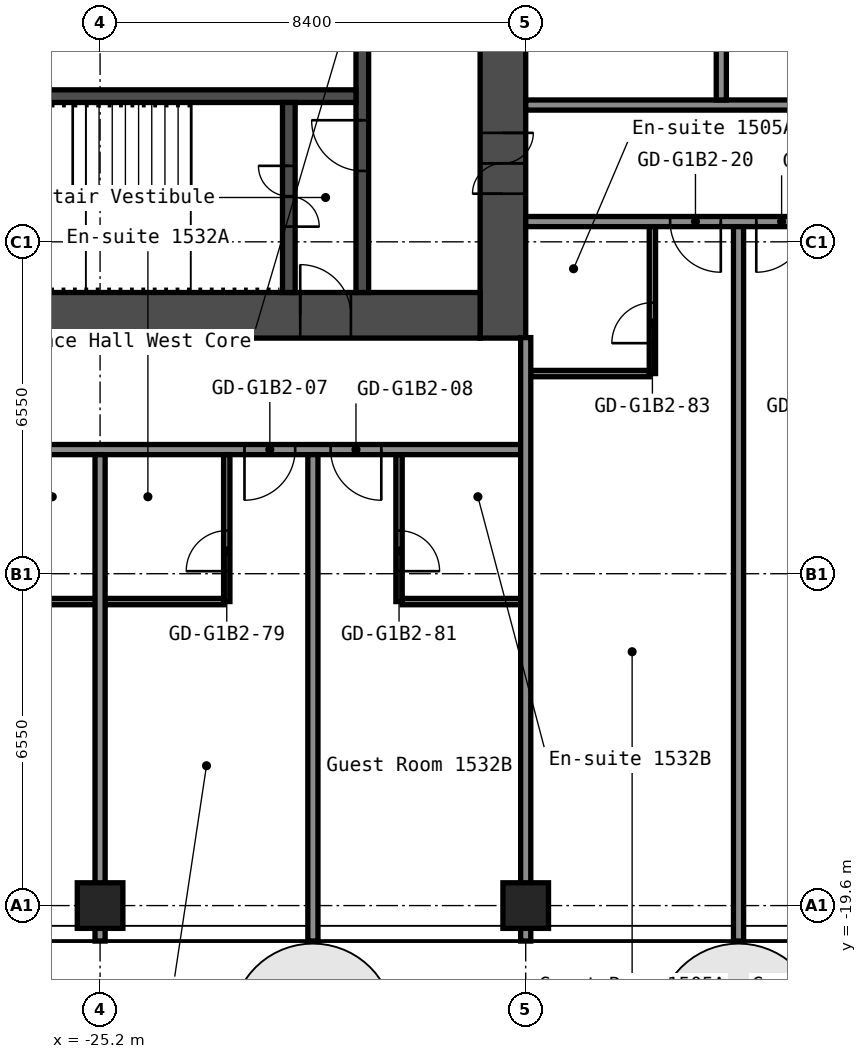
"""IFC4 building model, lengths in metres.
Left out: names, types, materials, properties, quantities, classifications, styles, units other than length and angle.
Written with IfcOpenShell. Run it as: python <this file> out.ifc"""

import sys

from ifc_helpers import new_model, si_unit, direction, frame, frame_2d, origin, origin_2d, place, context, subcontext, project, spatial, rectangle, hollow_rectangle, extrude, element, fill, save


model = new_model("IFC4")
c1 = context("Model", 3, precision=1e-05, world=origin(), true_north=direction((0.0, 1.0)))
c2 = subcontext(c1, "Body", "Model", "MODEL_VIEW")
j1 = project(units=[si_unit("LENGTHUNIT", "METRE"), si_unit("PLANEANGLEUNIT", "RADIAN")], contexts=[c1])
p1 = place(None, origin())
s1 = spatial("IfcSite", under=j1, at=p1, CompositionType="ELEMENT")
p2 = place(p1, origin())
s2 = spatial("IfcBuilding", under=s1, at=p2, CompositionType="ELEMENT")
p3 = place(p2, frame((0.0, 0.0, 55.0)))
s3 = spatial("IfcBuildingStorey", under=s2, at=p3, CompositionType="ELEMENT", Elevation=55.0)
for number, where, z_axis, x_axis in (
    (1, (-25.2, -19.6, 0.0), (0.0, 0.0, 1.0), (1.0, 0.0, 0.0)),
    (2, (-16.8, -19.6, 0.0), (0.0, 0.0, 1.0), (1.0, 0.0, 0.0)),
):
    element("IfcColumn", number, at=place(p3, frame(where, z_axis=z_axis, x_axis=x_axis)), inside=s3, PredefinedType="COLUMN", context=c2, shape_type="SweptSolid", body=[
        extrude(hollow_rectangle(XDim=0.9, YDim=0.9, WallThickness=0.036, at=origin_2d()), origin(), (0.0, 0.0, 1.0), 2.8),
    ])
p4 = place(p3, frame((-17.25, -8.4, 0.0), z_axis=(0.0, 0.0, 1.0), x_axis=(0.0, 1.0, 0.0)))
e3 = element("IfcWall", 3, at=p4, inside=s3, PredefinedType="SHEAR", context=c2, shape_type="SweptSolid", body=[
    extrude(rectangle(XDim=16.8, YDim=0.9, at=frame_2d((8.4, 0.0))), origin(), (0.0, 0.0, 1.0), 2.8),
])
p5 = place(p4, frame((12.75, 0.0, 0.0)))
e4 = element("IfcOpeningElement", 4, at=p5, cuts=e3, PredefinedType="OPENING", context=c2, shape_type="SweptSolid", body=[
    extrude(rectangle(XDim=1.2, YDim=2.1, at=frame_2d((0.6, 1.05))), frame((0.0, 0.46, 0.0), z_axis=(0.0, -1.0, 0.0), x_axis=(1.0, 0.0, 0.0)), (0.0, 0.0, 1.0), 0.92),
])
p6 = place(p4, frame((2.85, 0.0, 0.0)))
e5 = element("IfcOpeningElement", 5, at=p6, cuts=e3, PredefinedType="OPENING", context=c2, shape_type="SweptSolid", body=[
    extrude(rectangle(XDim=1.2, YDim=2.1, at=frame_2d((0.6, 1.05))), frame((0.0, 0.46, 0.0), z_axis=(0.0, -1.0, 0.0), x_axis=(1.0, 0.0, 0.0)), (0.0, 0.0, 1.0), 0.92),
])
p7 = place(p3, frame((-32.7, -7.95, 0.0), z_axis=(0.0, 0.0, 1.0), x_axis=(1.0, 0.0, 0.0)))
e6 = element("IfcWall", 6, at=p7, inside=s3, PredefinedType="SHEAR", context=c2, shape_type="SweptSolid", body=[
    extrude(rectangle(XDim=15.0, YDim=0.9, at=frame_2d((7.5, 0.0))), origin(), (0.0, 0.0, 1.0), 2.8),
])
p8 = place(p7, frame((11.45, 0.0, 0.0)))
e7 = element("IfcOpeningElement", 7, at=p8, cuts=e6, PredefinedType="OPENING", context=c2, shape_type="SweptSolid", body=[
    extrude(rectangle(XDim=1.0, YDim=2.1, at=frame_2d((0.5, 1.05))), frame((0.0, 0.46, 0.0), z_axis=(0.0, -1.0, 0.0), x_axis=(1.0, 0.0, 0.0)), (0.0, 0.0, 1.0), 0.92),
])
p9 = place(p3, frame((-20.025, -7.5, 0.0), z_axis=(0.0, 0.0, 1.0), x_axis=(0.0, 1.0, 0.0)))
e8 = element("IfcWall", 8, at=p9, inside=s3, PredefinedType="SHEAR", context=c2, shape_type="SweptSolid", body=[
    extrude(rectangle(XDim=6.3, YDim=0.25, at=frame_2d((3.15, 0.0))), origin(), (0.0, 0.0, 1.0), 2.8),
])
p10 = place(p9, frame((2.4, 0.0, 0.0)))
e9 = element("IfcOpeningElement", 9, at=p10, cuts=e8, PredefinedType="OPENING", context=c2, shape_type="SweptSolid", body=[
    extrude(rectangle(XDim=1.0, YDim=2.1, at=frame_2d((0.5, 1.05))), frame((0.0, 0.135, 0.0), z_axis=(0.0, -1.0, 0.0), x_axis=(1.0, 0.0, 0.0)), (0.0, 0.0, 1.0), 0.27),
])
p11 = place(p3, frame((-27.65, -3.625, 0.0), z_axis=(0.0, 0.0, 1.0), x_axis=(1.0, 0.0, 0.0)))
e10 = element("IfcWall", 10, at=p11, inside=s3, PredefinedType="SHEAR", context=c2, shape_type="SweptSolid", body=[
    extrude(rectangle(XDim=7.5, YDim=0.25, at=frame_2d((3.75, 0.0))), origin(), (0.0, 0.0, 1.0), 2.8),
])
p12 = place(p3, frame((-21.475, -7.5, 0.0), z_axis=(0.0, 0.0, 1.0), x_axis=(0.0, 1.0, 0.0)))
e11 = element("IfcWall", 11, at=p12, inside=s3, PredefinedType="SHEAR", context=c2, shape_type="SweptSolid", body=[
    extrude(rectangle(XDim=3.75, YDim=0.25, at=frame_2d((1.875, 0.0))), origin(), (0.0, 0.0, 1.0), 2.8),
])
p13 = place(p12, frame((1.3, 0.0, 0.0)))
e12 = element("IfcOpeningElement", 12, at=p13, cuts=e11, PredefinedType="OPENING", context=c2, shape_type="SweptSolid", body=[
    extrude(rectangle(XDim=1.2, YDim=2.1, at=frame_2d((0.6, 1.05))), frame((0.0, 0.135, 0.0), z_axis=(0.0, -1.0, 0.0), x_axis=(1.0, 0.0, 0.0)), (0.0, 0.0, 1.0), 0.27),
])
p14 = place(p3, frame((-27.637, -13.6, 0.0), z_axis=(0.0, 0.0, 1.0), x_axis=(1.0, 0.0, 0.0)))
e13 = element("IfcWall", 13, at=p14, inside=s3, PredefinedType="PARTITIONING", context=c2, shape_type="SweptSolid", body=[
    extrude(rectangle(XDim=4.875, YDim=0.125, at=frame_2d((2.438, 0.0))), origin(), (0.0, 0.0, 1.0), 2.8),
])
p15 = place(p3, frame((-19.238, -13.6, 0.0), z_axis=(0.0, 0.0, 1.0), x_axis=(1.0, 0.0, 0.0)))
e14 = element("IfcWall", 14, at=p15, inside=s3, PredefinedType="PARTITIONING", context=c2, shape_type="SweptSolid", body=[
    extrude(rectangle(XDim=2.338, YDim=0.125, at=frame_2d((1.169, 0.0))), origin(), (0.0, 0.0, 1.0), 2.8),
])
p16 = place(p3, frame((-51.1, -10.6, 0.0), z_axis=(0.0, 0.0, 1.0), x_axis=(1.0, 0.0, 0.0)))
e15 = element("IfcWall", 15, at=p16, inside=s3, PredefinedType="PARTITIONING", context=c2, shape_type="SweptSolid", body=[
    extrude(rectangle(XDim=34.3, YDim=0.2, at=frame_2d((17.15, 0.0))), origin(), (0.0, 0.0, 1.0), 2.8),
])
p17 = place(p16, frame((3.25, 0.0, 0.0)))
e16 = element("IfcOpeningElement", 16, at=p17, cuts=e15, PredefinedType="OPENING", context=c2, shape_type="SweptSolid", body=[
    extrude(rectangle(XDim=1.0, YDim=2.1, at=frame_2d((0.5, 1.05))), frame((0.0, 0.11, 0.0), z_axis=(0.0, -1.0, 0.0), x_axis=(1.0, 0.0, 0.0)), (0.0, 0.0, 1.0), 0.22),
])
p18 = place(p16, frame((5.15, 0.0, 0.0)))
e17 = element("IfcOpeningElement", 17, at=p18, cuts=e15, PredefinedType="OPENING", context=c2, shape_type="SweptSolid", body=[
    extrude(rectangle(XDim=1.0, YDim=2.1, at=frame_2d((0.5, 1.05))), frame((0.0, 0.11, 0.0), z_axis=(0.0, -1.0, 0.0), x_axis=(1.0, 0.0, 0.0)), (0.0, 0.0, 1.0), 0.22),
])
p19 = place(p16, frame((11.95, 0.0, 0.0)))
e18 = element("IfcOpeningElement", 18, at=p19, cuts=e15, PredefinedType="OPENING", context=c2, shape_type="SweptSolid", body=[
    extrude(rectangle(XDim=1.0, YDim=2.1, at=frame_2d((0.5, 1.05))), frame((0.0, 0.11, 0.0), z_axis=(0.0, -1.0, 0.0), x_axis=(1.0, 0.0, 0.0)), (0.0, 0.0, 1.0), 0.22),
])
p20 = place(p16, frame((13.65, 0.0, 0.0)))
e19 = element("IfcOpeningElement", 19, at=p20, cuts=e15, PredefinedType="OPENING", context=c2, shape_type="SweptSolid", body=[
    extrude(rectangle(XDim=1.0, YDim=2.1, at=frame_2d((0.5, 1.05))), frame((0.0, 0.11, 0.0), z_axis=(0.0, -1.0, 0.0), x_axis=(1.0, 0.0, 0.0)), (0.0, 0.0, 1.0), 0.22),
])
p21 = place(p16, frame((20.35, 0.0, 0.0)))
e20 = element("IfcOpeningElement", 20, at=p21, cuts=e15, PredefinedType="OPENING", context=c2, shape_type="SweptSolid", body=[
    extrude(rectangle(XDim=1.0, YDim=2.1, at=frame_2d((0.5, 1.05))), frame((0.0, 0.11, 0.0), z_axis=(0.0, -1.0, 0.0), x_axis=(1.0, 0.0, 0.0)), (0.0, 0.0, 1.0), 0.22),
])
p22 = place(p16, frame((22.05, 0.0, 0.0)))
e21 = element("IfcOpeningElement", 21, at=p22, cuts=e15, PredefinedType="OPENING", context=c2, shape_type="SweptSolid", body=[
    extrude(rectangle(XDim=1.0, YDim=2.1, at=frame_2d((0.5, 1.05))), frame((0.0, 0.11, 0.0), z_axis=(0.0, -1.0, 0.0), x_axis=(1.0, 0.0, 0.0)), (0.0, 0.0, 1.0), 0.22),
])
p23 = place(p16, frame((28.75, 0.0, 0.0)))
e22 = element("IfcOpeningElement", 22, at=p23, cuts=e15, PredefinedType="OPENING", context=c2, shape_type="SweptSolid", body=[
    extrude(rectangle(XDim=1.0, YDim=2.1, at=frame_2d((0.5, 1.05))), frame((0.0, 0.11, 0.0), z_axis=(0.0, -1.0, 0.0), x_axis=(1.0, 0.0, 0.0)), (0.0, 0.0, 1.0), 0.22),
])
p24 = place(p16, frame((30.45, 0.0, 0.0)))
e23 = element("IfcOpeningElement", 23, at=p24, cuts=e15, PredefinedType="OPENING", context=c2, shape_type="SweptSolid", body=[
    extrude(rectangle(XDim=1.0, YDim=2.1, at=frame_2d((0.5, 1.05))), frame((0.0, 0.11, 0.0), z_axis=(0.0, -1.0, 0.0), x_axis=(1.0, 0.0, 0.0)), (0.0, 0.0, 1.0), 0.22),
])
p25 = place(p3, frame((-16.7, -9.1, 0.0), z_axis=(0.0, 0.0, 1.0), x_axis=(1.0, 0.0, 0.0)))
e24 = element("IfcWall", 24, at=p25, inside=s3, PredefinedType="PARTITIONING", context=c2, shape_type="SweptSolid", body=[
    extrude(rectangle(XDim=2.337, YDim=0.125, at=frame_2d((1.169, 0.0))), origin(), (0.0, 0.0, 1.0), 2.8),
])
p26 = place(p3, frame((-16.8, -6.1, 0.0), z_axis=(0.0, 0.0, 1.0), x_axis=(1.0, 0.0, 0.0)))
e25 = element("IfcWall", 25, at=p26, inside=s3, PredefinedType="PARTITIONING", context=c2, shape_type="SweptSolid", body=[
    extrude(rectangle(XDim=33.6, YDim=0.2, at=frame_2d((16.8, 0.0))), origin(), (0.0, 0.0, 1.0), 2.8),
])
p27 = place(p26, frame((2.85, 0.0, 0.0)))
e26 = element("IfcOpeningElement", 26, at=p27, cuts=e25, PredefinedType="OPENING", context=c2, shape_type="SweptSolid", body=[
    extrude(rectangle(XDim=1.0, YDim=2.1, at=frame_2d((0.5, 1.05))), frame((0.0, 0.11, 0.0), z_axis=(0.0, -1.0, 0.0), x_axis=(1.0, 0.0, 0.0)), (0.0, 0.0, 1.0), 0.22),
])
p28 = place(p26, frame((4.55, 0.0, 0.0)))
e27 = element("IfcOpeningElement", 27, at=p28, cuts=e25, PredefinedType="OPENING", context=c2, shape_type="SweptSolid", body=[
    extrude(rectangle(XDim=1.0, YDim=2.1, at=frame_2d((0.5, 1.05))), frame((0.0, 0.11, 0.0), z_axis=(0.0, -1.0, 0.0), x_axis=(1.0, 0.0, 0.0)), (0.0, 0.0, 1.0), 0.22),
])
p29 = place(p26, frame((11.25, 0.0, 0.0)))
e28 = element("IfcOpeningElement", 28, at=p29, cuts=e25, PredefinedType="OPENING", context=c2, shape_type="SweptSolid", body=[
    extrude(rectangle(XDim=1.0, YDim=2.1, at=frame_2d((0.5, 1.05))), frame((0.0, 0.11, 0.0), z_axis=(0.0, -1.0, 0.0), x_axis=(1.0, 0.0, 0.0)), (0.0, 0.0, 1.0), 0.22),
])
p30 = place(p26, frame((12.95, 0.0, 0.0)))
e29 = element("IfcOpeningElement", 29, at=p30, cuts=e25, PredefinedType="OPENING", context=c2, shape_type="SweptSolid", body=[
    extrude(rectangle(XDim=1.0, YDim=2.1, at=frame_2d((0.5, 1.05))), frame((0.0, 0.11, 0.0), z_axis=(0.0, -1.0, 0.0), x_axis=(1.0, 0.0, 0.0)), (0.0, 0.0, 1.0), 0.22),
])
p31 = place(p26, frame((18.7, 0.0, 0.0)))
e30 = element("IfcOpeningElement", 30, at=p31, cuts=e25, PredefinedType="OPENING", context=c2, shape_type="SweptSolid", body=[
    extrude(rectangle(XDim=0.9, YDim=2.1, at=frame_2d((0.45, 1.05))), frame((0.0, 0.11, 0.0), z_axis=(0.0, -1.0, 0.0), x_axis=(1.0, 0.0, 0.0)), (0.0, 0.0, 1.0), 0.22),
])
p32 = place(p26, frame((22.9, 0.0, 0.0)))
e31 = element("IfcOpeningElement", 31, at=p32, cuts=e25, PredefinedType="OPENING", context=c2, shape_type="SweptSolid", body=[
    extrude(rectangle(XDim=0.9, YDim=2.1, at=frame_2d((0.45, 1.05))), frame((0.0, 0.11, 0.0), z_axis=(0.0, -1.0, 0.0), x_axis=(1.0, 0.0, 0.0)), (0.0, 0.0, 1.0), 0.22),
])
p33 = place(p26, frame((28.05, 0.0, 0.0)))
e32 = element("IfcOpeningElement", 32, at=p33, cuts=e25, PredefinedType="OPENING", context=c2, shape_type="SweptSolid", body=[
    extrude(rectangle(XDim=1.0, YDim=2.1, at=frame_2d((0.5, 1.05))), frame((0.0, 0.11, 0.0), z_axis=(0.0, -1.0, 0.0), x_axis=(1.0, 0.0, 0.0)), (0.0, 0.0, 1.0), 0.22),
])
p34 = place(p26, frame((29.75, 0.0, 0.0)))
e33 = element("IfcOpeningElement", 33, at=p34, cuts=e25, PredefinedType="OPENING", context=c2, shape_type="SweptSolid", body=[
    extrude(rectangle(XDim=1.0, YDim=2.1, at=frame_2d((0.5, 1.05))), frame((0.0, 0.11, 0.0), z_axis=(0.0, -1.0, 0.0), x_axis=(1.0, 0.0, 0.0)), (0.0, 0.0, 1.0), 0.22),
])
p35 = place(p3, frame((-16.8, -3.8, 0.0), z_axis=(0.0, 0.0, 1.0), x_axis=(1.0, 0.0, 0.0)))
e34 = element("IfcWall", 34, at=p35, inside=s3, PredefinedType="PARTITIONING", context=c2, shape_type="SweptSolid", body=[
    extrude(rectangle(XDim=33.6, YDim=0.2, at=frame_2d((16.8, 0.0))), origin(), (0.0, 0.0, 1.0), 2.8),
])
p36 = place(p35, frame((9.8, 0.0, 0.0)))
e35 = element("IfcOpeningElement", 35, at=p36, cuts=e34, PredefinedType="OPENING", context=c2, shape_type="SweptSolid", body=[
    extrude(rectangle(XDim=0.9, YDim=2.1, at=frame_2d((0.45, 1.05))), frame((0.0, 0.11, 0.0), z_axis=(0.0, -1.0, 0.0), x_axis=(1.0, 0.0, 0.0)), (0.0, 0.0, 1.0), 0.22),
])
p37 = place(p35, frame((14.0, 0.0, 0.0)))
e36 = element("IfcOpeningElement", 36, at=p37, cuts=e34, PredefinedType="OPENING", context=c2, shape_type="SweptSolid", body=[
    extrude(rectangle(XDim=0.9, YDim=2.1, at=frame_2d((0.45, 1.05))), frame((0.0, 0.11, 0.0), z_axis=(0.0, -1.0, 0.0), x_axis=(1.0, 0.0, 0.0)), (0.0, 0.0, 1.0), 0.22),
])
p38 = place(p35, frame((26.43, 0.0, 0.0)))
e37 = element("IfcOpeningElement", 37, at=p38, cuts=e34, PredefinedType="OPENING", context=c2, shape_type="SweptSolid", body=[
    extrude(rectangle(XDim=0.9, YDim=2.1, at=frame_2d((0.45, 1.05))), frame((0.0, 0.11, 0.0), z_axis=(0.0, -1.0, 0.0), x_axis=(1.0, 0.0, 0.0)), (0.0, 0.0, 1.0), 0.22),
])
p39 = place(p35, frame((30.63, 0.0, 0.0)))
e38 = element("IfcOpeningElement", 38, at=p39, cuts=e34, PredefinedType="OPENING", context=c2, shape_type="SweptSolid", body=[
    extrude(rectangle(XDim=0.9, YDim=2.1, at=frame_2d((0.45, 1.05))), frame((0.0, 0.11, 0.0), z_axis=(0.0, -1.0, 0.0), x_axis=(1.0, 0.0, 0.0)), (0.0, 0.0, 1.0), 0.22),
])
p40 = place(p3, frame((-25.2, -20.3, 0.0), z_axis=(0.0, 0.0, 1.0), x_axis=(0.0, 1.0, 0.0)))
e39 = element("IfcWall", 39, at=p40, inside=s3, PredefinedType="PARTITIONING", context=c2, shape_type="SweptSolid", body=[
    extrude(rectangle(XDim=9.6, YDim=0.2, at=frame_2d((4.8, 0.0))), origin(), (0.0, 0.0, 1.0), 2.8),
])
p41 = place(p3, frame((-22.7, -13.6, 0.0), z_axis=(0.0, 0.0, 1.0), x_axis=(0.0, 1.0, 0.0)))
e40 = element("IfcWall", 40, at=p41, inside=s3, PredefinedType="PARTITIONING", context=c2, shape_type="SweptSolid", body=[
    extrude(rectangle(XDim=2.9, YDim=0.125, at=frame_2d((1.45, 0.0))), origin(), (0.0, 0.0, 1.0), 2.8),
])
p42 = place(p41, frame((0.6, 0.0, 0.0)))
e41 = element("IfcOpeningElement", 41, at=p42, cuts=e40, PredefinedType="OPENING", context=c2, shape_type="SweptSolid", body=[
    extrude(rectangle(XDim=0.8, YDim=2.1, at=frame_2d((0.4, 1.05))), frame((0.0, 0.073, 0.0), z_axis=(0.0, -1.0, 0.0), x_axis=(1.0, 0.0, 0.0)), (0.0, 0.0, 1.0), 0.145),
])
p43 = place(p3, frame((-21.0, -20.3, 0.0), z_axis=(0.0, 0.0, 1.0), x_axis=(0.0, 1.0, 0.0)))
e42 = element("IfcWall", 42, at=p43, inside=s3, PredefinedType="PARTITIONING", context=c2, shape_type="SweptSolid", body=[
    extrude(rectangle(XDim=9.6, YDim=0.2, at=frame_2d((4.8, 0.0))), origin(), (0.0, 0.0, 1.0), 2.8),
])
p44 = place(p3, frame((-19.3, -13.6, 0.0), z_axis=(0.0, 0.0, 1.0), x_axis=(0.0, 1.0, 0.0)))
e43 = element("IfcWall", 43, at=p44, inside=s3, PredefinedType="PARTITIONING", context=c2, shape_type="SweptSolid", body=[
    extrude(rectangle(XDim=2.9, YDim=0.125, at=frame_2d((1.45, 0.0))), origin(), (0.0, 0.0, 1.0), 2.8),
])
p45 = place(p44, frame((0.6, 0.0, 0.0)))
e44 = element("IfcOpeningElement", 44, at=p45, cuts=e43, PredefinedType="OPENING", context=c2, shape_type="SweptSolid", body=[
    extrude(rectangle(XDim=0.8, YDim=2.1, at=frame_2d((0.4, 1.05))), frame((0.0, 0.073, 0.0), z_axis=(0.0, -1.0, 0.0), x_axis=(1.0, 0.0, 0.0)), (0.0, 0.0, 1.0), 0.145),
])
p46 = place(p3, frame((-16.8, -20.3, 0.0), z_axis=(0.0, 0.0, 1.0), x_axis=(0.0, 1.0, 0.0)))
e45 = element("IfcWall", 45, at=p46, inside=s3, PredefinedType="PARTITIONING", context=c2, shape_type="SweptSolid", body=[
    extrude(rectangle(XDim=11.91, YDim=0.2, at=frame_2d((5.955, 0.0))), origin(), (0.0, 0.0, 1.0), 2.8),
])
p47 = place(p3, frame((-14.3, -9.1, 0.0), z_axis=(0.0, 0.0, 1.0), x_axis=(0.0, 1.0, 0.0)))
e46 = element("IfcWall", 46, at=p47, inside=s3, PredefinedType="PARTITIONING", context=c2, shape_type="SweptSolid", body=[
    extrude(rectangle(XDim=2.9, YDim=0.125, at=frame_2d((1.45, 0.0))), origin(), (0.0, 0.0, 1.0), 2.8),
])
p48 = place(p47, frame((0.6, 0.0, 0.0)))
e47 = element("IfcOpeningElement", 47, at=p48, cuts=e46, PredefinedType="OPENING", context=c2, shape_type="SweptSolid", body=[
    extrude(rectangle(XDim=0.8, YDim=2.1, at=frame_2d((0.4, 1.05))), frame((0.0, 0.073, 0.0), z_axis=(0.0, -1.0, 0.0), x_axis=(1.0, 0.0, 0.0)), (0.0, 0.0, 1.0), 0.145),
])
p49 = place(p3, frame((-12.94, -3.7, 0.0), z_axis=(0.0, 0.0, 1.0), x_axis=(0.0, 1.0, 0.0)))
e48 = element("IfcWall", 48, at=p49, inside=s3, PredefinedType="PARTITIONING", context=c2, shape_type="SweptSolid", body=[
    extrude(rectangle(XDim=7.4, YDim=0.2, at=frame_2d((3.7, 0.0))), origin(), (0.0, 0.0, 1.0), 2.8),
])
p50 = place(p3, frame((-12.6, -20.3, 0.0), z_axis=(0.0, 0.0, 1.0), x_axis=(0.0, 1.0, 0.0)))
e49 = element("IfcWall", 49, at=p50, inside=s3, PredefinedType="PARTITIONING", context=c2, shape_type="SweptSolid", body=[
    extrude(rectangle(XDim=14.1, YDim=0.2, at=frame_2d((7.05, 0.0))), origin(), (0.0, 0.0, 1.0), 2.8),
])
p51 = place(p6, origin())
e50 = element("IfcDoor", 50, at=p51, inside=s3, OperationType="DOUBLE_DOOR_SINGLE_SWING", PredefinedType="DOOR", context=c2, shape_type="SweptSolid", body=[
    extrude(rectangle(XDim=1.2, YDim=2.1, at=frame_2d((0.6, 1.05))), frame((0.0, 0.025, 0.0), z_axis=(0.0, -1.0, 0.0), x_axis=(1.0, 0.0, 0.0)), (0.0, 0.0, 1.0), 0.05),
])
fill(e5, e50)
p52 = place(p8, origin())
e51 = element("IfcDoor", 51, at=p52, inside=s3, OperationType="SINGLE_SWING_RIGHT", PredefinedType="DOOR", context=c2, shape_type="SweptSolid", body=[
    extrude(rectangle(XDim=1.0, YDim=2.1, at=frame_2d((0.5, 1.05))), frame((0.0, 0.025, 0.0), z_axis=(0.0, -1.0, 0.0), x_axis=(1.0, 0.0, 0.0)), (0.0, 0.0, 1.0), 0.05),
])
fill(e7, e51)
p53 = place(p13, origin())
e52 = element("IfcDoor", 52, at=p53, inside=s3, OperationType="DOUBLE_DOOR_SINGLE_SWING", PredefinedType="DOOR", context=c2, shape_type="SweptSolid", body=[
    extrude(rectangle(XDim=1.2, YDim=2.1, at=frame_2d((0.6, 1.05))), frame((0.0, 0.025, 0.0), z_axis=(0.0, -1.0, 0.0), x_axis=(1.0, 0.0, 0.0)), (0.0, 0.0, 1.0), 0.05),
])
fill(e12, e52)
p54 = place(p10, origin())
e53 = element("IfcDoor", 53, at=p54, inside=s3, OperationType="SINGLE_SWING_LEFT", PredefinedType="DOOR", context=c2, shape_type="SweptSolid", body=[
    extrude(rectangle(XDim=1.0, YDim=2.1, at=frame_2d((0.5, 1.05))), frame((0.0, 0.025, 0.0), z_axis=(0.0, -1.0, 0.0), x_axis=(1.0, 0.0, 0.0)), (0.0, 0.0, 1.0), 0.05),
])
fill(e9, e53)
p55 = place(p23, origin())
e54 = element("IfcDoor", 54, at=p55, inside=s3, OperationType="SINGLE_SWING_LEFT", PredefinedType="DOOR", context=c2, shape_type="SweptSolid", body=[
    extrude(rectangle(XDim=1.0, YDim=2.1, at=frame_2d((0.5, 1.05))), frame((0.0, 0.025, 0.0), z_axis=(0.0, -1.0, 0.0), x_axis=(1.0, 0.0, 0.0)), (0.0, 0.0, 1.0), 0.05),
])
fill(e22, e54)
p56 = place(p24, origin())
e55 = element("IfcDoor", 55, at=p56, inside=s3, OperationType="SINGLE_SWING_RIGHT", PredefinedType="DOOR", context=c2, shape_type="SweptSolid", body=[
    extrude(rectangle(XDim=1.0, YDim=2.1, at=frame_2d((0.5, 1.05))), frame((0.0, 0.025, 0.0), z_axis=(0.0, -1.0, 0.0), x_axis=(1.0, 0.0, 0.0)), (0.0, 0.0, 1.0), 0.05),
])
fill(e23, e55)
p57 = place(p27, origin())
e56 = element("IfcDoor", 56, at=p57, inside=s3, OperationType="SINGLE_SWING_RIGHT", PredefinedType="DOOR", context=c2, shape_type="SweptSolid", body=[
    extrude(rectangle(XDim=1.0, YDim=2.1, at=frame_2d((0.5, 1.05))), frame((0.0, 0.025, 0.0), z_axis=(0.0, -1.0, 0.0), x_axis=(1.0, 0.0, 0.0)), (0.0, 0.0, 1.0), 0.05),
])
fill(e26, e56)
p58 = place(p28, origin())
e57 = element("IfcDoor", 57, at=p58, inside=s3, OperationType="SINGLE_SWING_LEFT", PredefinedType="DOOR", context=c2, shape_type="SweptSolid", body=[
    extrude(rectangle(XDim=1.0, YDim=2.1, at=frame_2d((0.5, 1.05))), frame((0.0, 0.025, 0.0), z_axis=(0.0, -1.0, 0.0), x_axis=(1.0, 0.0, 0.0)), (0.0, 0.0, 1.0), 0.05),
])
fill(e27, e57)
p59 = place(p42, origin())
e58 = element("IfcDoor", 58, at=p59, inside=s3, OperationType="SINGLE_SWING_RIGHT", PredefinedType="DOOR", context=c2, shape_type="SweptSolid", body=[
    extrude(rectangle(XDim=0.8, YDim=2.1, at=frame_2d((0.4, 1.05))), frame((0.0, 0.025, 0.0), z_axis=(0.0, -1.0, 0.0), x_axis=(1.0, 0.0, 0.0)), (0.0, 0.0, 1.0), 0.05),
])
fill(e41, e58)
p60 = place(p45, origin())
e59 = element("IfcDoor", 59, at=p60, inside=s3, OperationType="SINGLE_SWING_LEFT", PredefinedType="DOOR", context=c2, shape_type="SweptSolid", body=[
    extrude(rectangle(XDim=0.8, YDim=2.1, at=frame_2d((0.4, 1.05))), frame((0.0, 0.025, 0.0), z_axis=(0.0, -1.0, 0.0), x_axis=(1.0, 0.0, 0.0)), (0.0, 0.0, 1.0), 0.05),
])
fill(e44, e59)
p61 = place(p48, origin())
e60 = element("IfcDoor", 60, at=p61, inside=s3, OperationType="SINGLE_SWING_RIGHT", PredefinedType="DOOR", context=c2, shape_type="SweptSolid", body=[
    extrude(rectangle(XDim=0.8, YDim=2.1, at=frame_2d((0.4, 1.05))), frame((0.0, 0.025, 0.0), z_axis=(0.0, -1.0, 0.0), x_axis=(1.0, 0.0, 0.0)), (0.0, 0.0, 1.0), 0.05),
])
fill(e47, e60)
save(model, sys.argv[1])
